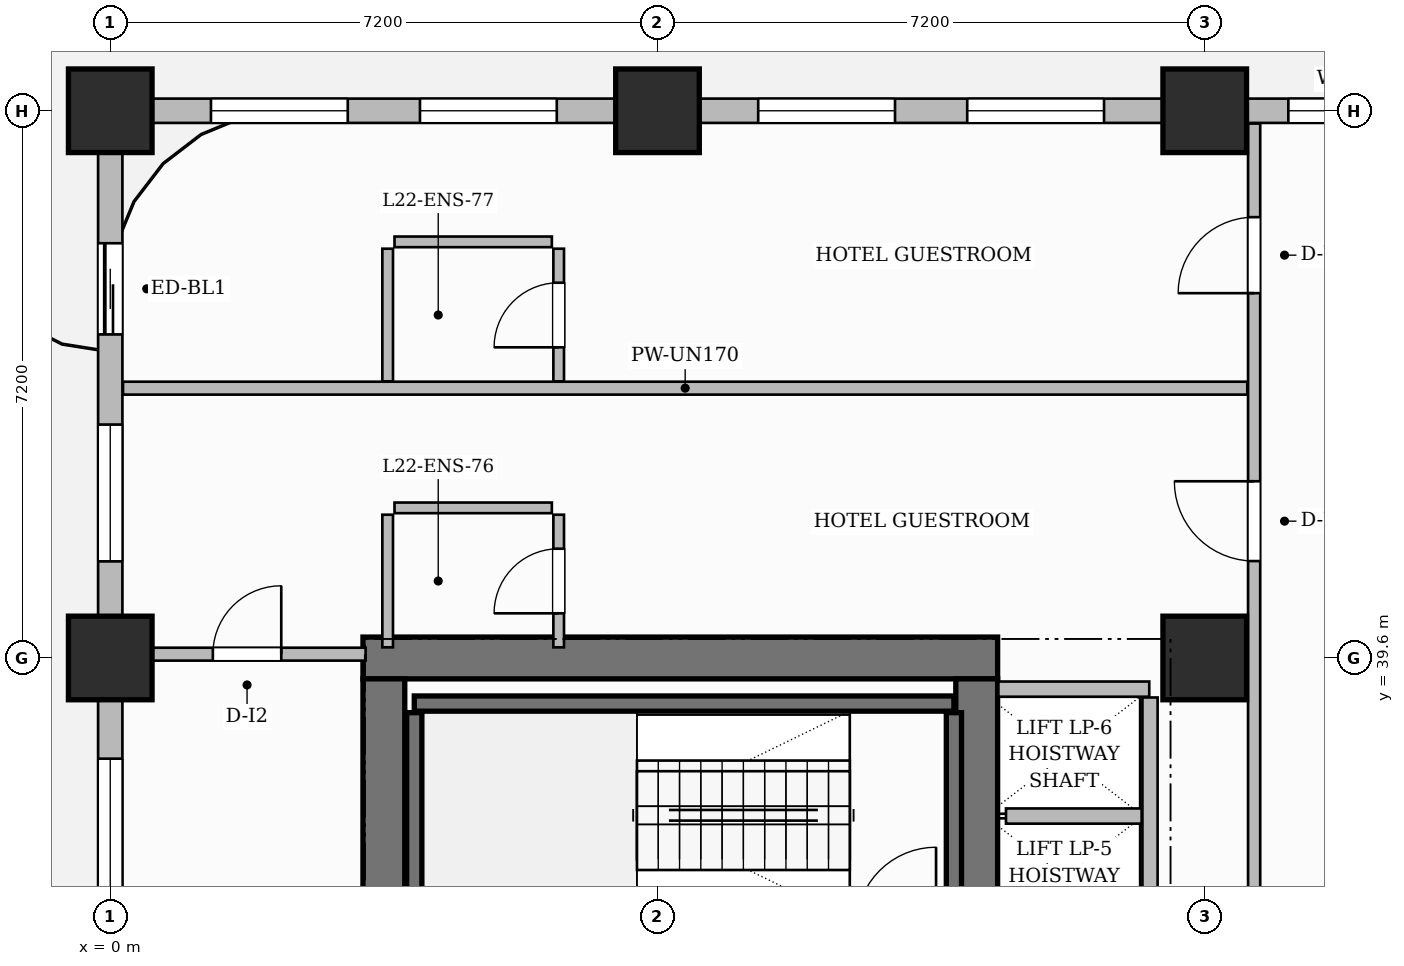
"""IFC4 building model, lengths in metres.
Left out: names, types, materials, properties, quantities, classifications, styles, units other than length and angle.
Written with IfcOpenShell. Run it as: python <this file> out.ifc"""

import sys

from ifc_helpers import new_model, si_unit, direction, frame, frame_2d, origin, origin_2d, place, context, subcontext, project, spatial, rectangle, extrude, source, transform, mapped, element, fill, save


model = new_model("IFC4")
c1 = context("Model", 3, precision=1e-05, world=origin(), true_north=direction((0.0, 1.0)))
c2 = subcontext(c1, "Body", "Model", "MODEL_VIEW")
j1 = project(units=[si_unit("LENGTHUNIT", "METRE"), si_unit("PLANEANGLEUNIT", "RADIAN")], contexts=[c1])
p1 = place(None, origin())
s1 = spatial("IfcSite", under=j1, at=p1, CompositionType="ELEMENT")
p2 = place(p1, origin())
s2 = spatial("IfcBuilding", under=s1, at=p2, CompositionType="ELEMENT")
p3 = place(p2, frame((0.0, 0.0, 91.6)))
s3 = spatial("IfcBuildingStorey", under=s2, at=p3, CompositionType="ELEMENT", Elevation=91.6)
p4 = place(p3, frame((3.325, 39.6, 0.0), z_axis=(0.0, 0.0, 1.0), x_axis=(1.0, 0.0, 0.0)))
e1 = element("IfcWall", 1, at=p4, inside=s3, PredefinedType="SHEAR", context=c2, shape_type="SweptSolid", body=[
    extrude(rectangle(XDim=8.35, YDim=0.55, at=frame_2d((4.175, 0.0))), origin(), (0.0, 0.0, 1.0), 3.7),
])
p5 = place(p3, frame((3.6, 25.475, 0.0), z_axis=(0.0, 0.0, 1.0), x_axis=(0.0, 1.0, 0.0)))
e2 = element("IfcWall", 2, at=p5, inside=s3, PredefinedType="SHEAR", context=c2, shape_type="SweptSolid", body=[
    extrude(rectangle(XDim=13.85, YDim=0.55, at=frame_2d((6.925, 0.0))), origin(), (0.0, 0.0, 1.0), 3.7),
])
p6 = place(p3, frame((11.4, 25.475, 0.0), z_axis=(0.0, 0.0, 1.0), x_axis=(0.0, 1.0, 0.0)))
e3 = element("IfcWall", 3, at=p6, inside=s3, PredefinedType="SHEAR", context=c2, shape_type="SweptSolid", body=[
    extrude(rectangle(XDim=13.85, YDim=0.55, at=frame_2d((6.925, 0.0))), origin(), (0.0, 0.0, 1.0), 3.7),
])
p7 = place(p6, frame((6.495, 0.0, 0.0)))
e4 = element("IfcOpeningElement", 4, at=p7, cuts=e3, PredefinedType="OPENING", context=c2, shape_type="SweptSolid", body=[
    extrude(rectangle(XDim=1.5, YDim=2.2, at=frame_2d((0.75, 1.1))), frame((0.0, 0.285, 0.0), z_axis=(0.0, -1.0, 0.0), x_axis=(1.0, 0.0, 0.0)), (0.0, 0.0, 1.0), 0.57),
])
m1 = source(origin(), c2, "Body", "SweptSolid", [
    extrude(rectangle(XDim=1.1, YDim=1.1, at=origin_2d()), origin(), (0.0, 0.0, 1.0), 3.7),
])
for number, where, z_axis, x_axis in (
    (5, (0.0, 39.6, 0.0), (0.0, 0.0, 1.0), (1.0, 0.0, 0.0)),
    (6, (0.0, 46.8, 0.0), (0.0, 0.0, 1.0), (1.0, 0.0, 0.0)),
    (7, (7.2, 46.8, 0.0), (0.0, 0.0, 1.0), (1.0, 0.0, 0.0)),
    (8, (14.4, 39.6, 0.0), (0.0, 0.0, 1.0), (1.0, 0.0, 0.0)),
    (9, (14.4, 46.8, 0.0), (0.0, 0.0, 1.0), (1.0, 0.0, 0.0)),
):
    element("IfcColumn", number, at=place(p3, frame(where, z_axis=z_axis, x_axis=x_axis)), inside=s3, PredefinedType="COLUMN", context=c2, shape_type="MappedRepresentation", body=[
        mapped(m1, transform((0.0, 0.0, 0.0), scale=1.0)),
    ])
p8 = place(p3, frame((4.0, 39.0, 0.0), z_axis=(0.0, 0.0, 1.0), x_axis=(1.0, 0.0, 0.0)))
e10 = element("IfcWall", 10, at=p8, inside=s3, PredefinedType="SHEAR", context=c2, shape_type="SweptSolid", body=[
    extrude(rectangle(XDim=7.1, YDim=0.2, at=frame_2d((3.55, 0.0))), origin(), (0.0, 0.0, 1.0), 3.7),
])
for number, where, z_axis, x_axis in (
    (11, (4.0, 36.18, 0.0), (0.0, 0.0, 1.0), (0.0, 1.0, 0.0)),
    (12, (11.1, 36.18, 0.0), (0.0, 0.0, 1.0), (0.0, 1.0, 0.0)),
):
    element("IfcWall", number, at=place(p3, frame(where, z_axis=z_axis, x_axis=x_axis)), inside=s3, PredefinedType="SHEAR", context=c2, shape_type="SweptSolid", body=[
        extrude(rectangle(XDim=2.7, YDim=0.2, at=frame_2d((1.35, 0.0))), origin(), (0.0, 0.0, 1.0), 3.7),
    ])
p9 = place(p3, frame((11.685, 39.19, 0.0), z_axis=(0.0, 0.0, 1.0), x_axis=(1.0, 0.0, 0.0)))
e13 = element("IfcWall", 13, at=p9, inside=s3, PredefinedType="PARTITIONING", context=c2, shape_type="SweptSolid", body=[
    extrude(rectangle(XDim=1.985, YDim=0.2, at=frame_2d((0.992, 0.0))), origin(), (0.0, 0.0, 1.0), 3.45),
])
p10 = place(p3, frame((13.68, 34.36, 0.0), z_axis=(0.0, 0.0, 1.0), x_axis=(0.0, 1.0, 0.0)))
e14 = element("IfcWall", 14, at=p10, inside=s3, PredefinedType="PARTITIONING", context=c2, shape_type="SweptSolid", body=[
    extrude(rectangle(XDim=4.72, YDim=0.2, at=frame_2d((2.36, 0.0))), origin(), (0.0, 0.0, 1.0), 3.45),
])
p11 = place(p3, frame((11.785, 37.52, 0.0), z_axis=(0.0, 0.0, 1.0), x_axis=(1.0, 0.0, 0.0)))
e15 = element("IfcWall", 15, at=p11, inside=s3, PredefinedType="PARTITIONING", context=c2, shape_type="SweptSolid", body=[
    extrude(rectangle(XDim=1.785, YDim=0.2, at=frame_2d((0.893, 0.0))), origin(), (0.0, 0.0, 1.0), 3.45),
])
p12 = place(p3, frame((0.24, 39.65, 0.0), z_axis=(0.0, 0.0, 1.0), x_axis=(1.0, 0.0, 0.0)))
e16 = element("IfcWall", 16, at=p12, inside=s3, PredefinedType="PARTITIONING", context=c2, shape_type="SweptSolid", body=[
    extrude(rectangle(XDim=3.12, YDim=0.17, at=frame_2d((1.56, 0.0))), origin(), (0.0, 0.0, 1.0), 3.45),
])
p13 = place(p12, frame((1.11, 0.0, 0.0)))
e17 = element("IfcOpeningElement", 17, at=p13, cuts=e16, PredefinedType="OPENING", context=c2, shape_type="SweptSolid", body=[
    extrude(rectangle(XDim=0.9, YDim=2.15, at=frame_2d((0.45, 1.075))), frame((0.0, 0.095, 0.0), z_axis=(0.0, -1.0, 0.0), x_axis=(1.0, 0.0, 0.0)), (0.0, 0.0, 1.0), 0.19),
])
p14 = place(p3, frame((15.05, 34.34, 0.0), z_axis=(0.0, 0.0, 1.0), x_axis=(0.0, 1.0, 0.0)))
e18 = element("IfcWall", 18, at=p14, inside=s3, PredefinedType="PARTITIONING", context=c2, shape_type="SweptSolid", body=[
    extrude(rectangle(XDim=12.292, YDim=0.16, at=frame_2d((6.146, 0.0))), origin(), (0.0, 0.0, 1.0), 3.45),
])
p15 = place(p14, frame((6.535, 0.0, 0.0)))
e19 = element("IfcOpeningElement", 19, at=p15, cuts=e18, PredefinedType="OPENING", context=c2, shape_type="SweptSolid", body=[
    extrude(rectangle(XDim=1.05, YDim=2.25, at=frame_2d((0.525, 1.125))), frame((0.0, 0.09, 0.0), z_axis=(0.0, -1.0, 0.0), x_axis=(1.0, 0.0, 0.0)), (0.0, 0.0, 1.0), 0.18),
])
p16 = place(p14, frame((10.06, 0.0, 0.0)))
e20 = element("IfcOpeningElement", 20, at=p16, cuts=e18, PredefinedType="OPENING", context=c2, shape_type="SweptSolid", body=[
    extrude(rectangle(XDim=1.0, YDim=2.2, at=frame_2d((0.5, 1.1))), frame((0.0, 0.09, 0.0), z_axis=(0.0, -1.0, 0.0), x_axis=(1.0, 0.0, 0.0)), (0.0, 0.0, 1.0), 0.18),
])
p17 = place(p3, frame((0.168, 43.15, 0.0), z_axis=(0.0, 0.0, 1.0), x_axis=(1.0, 0.0, 0.0)))
e21 = element("IfcWall", 21, at=p17, inside=s3, PredefinedType="PARTITIONING", context=c2, shape_type="SweptSolid", body=[
    extrude(rectangle(XDim=14.792, YDim=0.17, at=frame_2d((7.396, 0.0))), origin(), (0.0, 0.0, 1.0), 3.45),
])
p18 = place(p3, frame((3.65, 39.74, 0.0), z_axis=(0.0, 0.0, 1.0), x_axis=(0.0, 1.0, 0.0)))
e22 = element("IfcWall", 22, at=p18, inside=s3, PredefinedType="PARTITIONING", context=c2, shape_type="SweptSolid", body=[
    extrude(rectangle(XDim=1.745, YDim=0.14, at=frame_2d((0.873, 0.0))), origin(), (0.0, 0.0, 1.0), 3.45),
])
p19 = place(p3, frame((3.74, 41.575, 0.0), z_axis=(0.0, 0.0, 1.0), x_axis=(1.0, 0.0, 0.0)))
e23 = element("IfcWall", 23, at=p19, inside=s3, PredefinedType="PARTITIONING", context=c2, shape_type="SweptSolid", body=[
    extrude(rectangle(XDim=2.07, YDim=0.14, at=frame_2d((1.035, 0.0))), origin(), (0.0, 0.0, 1.0), 2.885),
])
p20 = place(p3, frame((5.9, 39.74, 0.0), z_axis=(0.0, 0.0, 1.0), x_axis=(0.0, 1.0, 0.0)))
e24 = element("IfcWall", 24, at=p20, inside=s3, PredefinedType="PARTITIONING", context=c2, shape_type="SweptSolid", body=[
    extrude(rectangle(XDim=1.745, YDim=0.14, at=frame_2d((0.873, 0.0))), origin(), (0.0, 0.0, 1.0), 3.45),
])
p21 = place(p20, frame((0.448, 0.0, 0.0)))
e25 = element("IfcOpeningElement", 25, at=p21, cuts=e24, PredefinedType="OPENING", context=c2, shape_type="SweptSolid", body=[
    extrude(rectangle(XDim=0.85, YDim=2.1, at=frame_2d((0.425, 1.05))), frame((0.0, 0.08, 0.0), z_axis=(0.0, -1.0, 0.0), x_axis=(1.0, 0.0, 0.0)), (0.0, 0.0, 1.0), 0.16),
])
p22 = place(p3, frame((3.65, 43.24, 0.0), z_axis=(0.0, 0.0, 1.0), x_axis=(0.0, 1.0, 0.0)))
e26 = element("IfcWall", 26, at=p22, inside=s3, PredefinedType="PARTITIONING", context=c2, shape_type="SweptSolid", body=[
    extrude(rectangle(XDim=1.745, YDim=0.14, at=frame_2d((0.873, 0.0))), origin(), (0.0, 0.0, 1.0), 3.45),
])
p23 = place(p3, frame((3.74, 45.075, 0.0), z_axis=(0.0, 0.0, 1.0), x_axis=(1.0, 0.0, 0.0)))
e27 = element("IfcWall", 27, at=p23, inside=s3, PredefinedType="PARTITIONING", context=c2, shape_type="SweptSolid", body=[
    extrude(rectangle(XDim=2.07, YDim=0.14, at=frame_2d((1.035, 0.0))), origin(), (0.0, 0.0, 1.0), 3.45),
])
p24 = place(p3, frame((5.9, 43.24, 0.0), z_axis=(0.0, 0.0, 1.0), x_axis=(0.0, 1.0, 0.0)))
e28 = element("IfcWall", 28, at=p24, inside=s3, PredefinedType="PARTITIONING", context=c2, shape_type="SweptSolid", body=[
    extrude(rectangle(XDim=1.745, YDim=0.14, at=frame_2d((0.873, 0.0))), origin(), (0.0, 0.0, 1.0), 3.45),
])
p25 = place(p24, frame((0.448, 0.0, 0.0)))
e29 = element("IfcOpeningElement", 29, at=p25, cuts=e28, PredefinedType="OPENING", context=c2, shape_type="SweptSolid", body=[
    extrude(rectangle(XDim=0.85, YDim=2.1, at=frame_2d((0.425, 1.05))), frame((0.0, 0.08, 0.0), z_axis=(0.0, -1.0, 0.0), x_axis=(1.0, 0.0, 0.0)), (0.0, 0.0, 1.0), 0.16),
])
p26 = place(p3, frame((0.0, 25.25, 0.0), z_axis=(0.0, 0.0, 1.0), x_axis=(0.0, 1.0, 0.0)))
e30 = element("IfcWall", 30, at=p26, inside=s3, PredefinedType="SOLIDWALL", context=c2, shape_type="SweptSolid", body=[
    extrude(rectangle(XDim=21.5, YDim=0.32, at=frame_2d((10.75, 0.0))), origin(), (0.0, 0.0, 1.0), 2.885),
])
p27 = place(p26, frame((18.607, 0.0, 0.0)))
e31 = element("IfcOpeningElement", 31, at=p27, cuts=e30, PredefinedType="OPENING", context=c2, shape_type="SweptSolid", body=[
    extrude(rectangle(XDim=1.2, YDim=2.2, at=frame_2d((0.6, 1.1))), frame((0.0, 0.17, 0.0), z_axis=(0.0, -1.0, 0.0), x_axis=(1.0, 0.0, 0.0)), (0.0, 0.0, 1.0), 0.34),
])
p28 = place(p26, frame((0.8, 0.0, 0.0)))
e32 = element("IfcOpeningElement", 32, at=p28, cuts=e30, PredefinedType="OPENING", context=c2, shape_type="SweptSolid", body=[
    extrude(rectangle(XDim=1.2, YDim=2.2, at=frame_2d((0.6, 1.1))), frame((0.0, 0.17, 0.0), z_axis=(0.0, -1.0, 0.0), x_axis=(1.0, 0.0, 0.0)), (0.0, 0.0, 1.0), 0.34),
])
p29 = place(p26, frame((3.425, 0.0, 0.8)))
e33 = element("IfcOpeningElement", 33, at=p29, cuts=e30, PredefinedType="OPENING", context=c2, shape_type="SweptSolid", body=[
    extrude(rectangle(XDim=1.8, YDim=1.85, at=frame_2d((0.9, 0.925))), frame((0.0, 0.17, 0.0), z_axis=(0.0, -1.0, 0.0), x_axis=(1.0, 0.0, 0.0)), (0.0, 0.0, 1.0), 0.34),
])
p30 = place(p26, frame((8.475, 0.0, 0.8)))
e34 = element("IfcOpeningElement", 34, at=p30, cuts=e30, PredefinedType="OPENING", context=c2, shape_type="SweptSolid", body=[
    extrude(rectangle(XDim=1.8, YDim=1.85, at=frame_2d((0.9, 0.925))), frame((0.0, 0.17, 0.0), z_axis=(0.0, -1.0, 0.0), x_axis=(1.0, 0.0, 0.0)), (0.0, 0.0, 1.0), 0.34),
])
p31 = place(p26, frame((11.225, 0.0, 0.8)))
e35 = element("IfcOpeningElement", 35, at=p31, cuts=e30, PredefinedType="OPENING", context=c2, shape_type="SweptSolid", body=[
    extrude(rectangle(XDim=1.8, YDim=1.85, at=frame_2d((0.9, 0.925))), frame((0.0, 0.17, 0.0), z_axis=(0.0, -1.0, 0.0), x_axis=(1.0, 0.0, 0.0)), (0.0, 0.0, 1.0), 0.34),
])
p32 = place(p26, frame((15.621, 0.0, 0.8)))
e36 = element("IfcOpeningElement", 36, at=p32, cuts=e30, PredefinedType="OPENING", context=c2, shape_type="SweptSolid", body=[
    extrude(rectangle(XDim=1.8, YDim=1.85, at=frame_2d((0.9, 0.925))), frame((0.0, 0.17, 0.0), z_axis=(0.0, -1.0, 0.0), x_axis=(1.0, 0.0, 0.0)), (0.0, 0.0, 1.0), 0.34),
])
p33 = place(p3, frame((0.0, 46.8, 0.0), z_axis=(0.0, 0.0, 1.0), x_axis=(1.0, 0.0, 0.0)))
e37 = element("IfcWall", 37, at=p33, inside=s3, PredefinedType="SOLIDWALL", context=c2, shape_type="SweptSolid", body=[
    extrude(rectangle(XDim=18.0, YDim=0.32, at=frame_2d((9.0, 0.0))), origin(), (0.0, 0.0, 1.0), 2.885),
])
p34 = place(p33, frame((1.325, 0.0, 0.8)))
e38 = element("IfcOpeningElement", 38, at=p34, cuts=e37, PredefinedType="OPENING", context=c2, shape_type="SweptSolid", body=[
    extrude(rectangle(XDim=1.8, YDim=1.85, at=frame_2d((0.9, 0.925))), frame((0.0, 0.17, 0.0), z_axis=(0.0, -1.0, 0.0), x_axis=(1.0, 0.0, 0.0)), (0.0, 0.0, 1.0), 0.34),
])
p35 = place(p33, frame((4.075, 0.0, 0.8)))
e39 = element("IfcOpeningElement", 39, at=p35, cuts=e37, PredefinedType="OPENING", context=c2, shape_type="SweptSolid", body=[
    extrude(rectangle(XDim=1.8, YDim=1.85, at=frame_2d((0.9, 0.925))), frame((0.0, 0.17, 0.0), z_axis=(0.0, -1.0, 0.0), x_axis=(1.0, 0.0, 0.0)), (0.0, 0.0, 1.0), 0.34),
])
p36 = place(p33, frame((8.525, 0.0, 0.8)))
e40 = element("IfcOpeningElement", 40, at=p36, cuts=e37, PredefinedType="OPENING", context=c2, shape_type="SweptSolid", body=[
    extrude(rectangle(XDim=1.8, YDim=1.85, at=frame_2d((0.9, 0.925))), frame((0.0, 0.17, 0.0), z_axis=(0.0, -1.0, 0.0), x_axis=(1.0, 0.0, 0.0)), (0.0, 0.0, 1.0), 0.34),
])
p37 = place(p33, frame((11.275, 0.0, 0.8)))
e41 = element("IfcOpeningElement", 41, at=p37, cuts=e37, PredefinedType="OPENING", context=c2, shape_type="SweptSolid", body=[
    extrude(rectangle(XDim=1.8, YDim=1.85, at=frame_2d((0.9, 0.925))), frame((0.0, 0.17, 0.0), z_axis=(0.0, -1.0, 0.0), x_axis=(1.0, 0.0, 0.0)), (0.0, 0.0, 1.0), 0.34),
])
p38 = place(p33, frame((15.5, 0.0, 0.8)))
e42 = element("IfcOpeningElement", 42, at=p38, cuts=e37, PredefinedType="OPENING", context=c2, shape_type="SweptSolid", body=[
    extrude(rectangle(XDim=1.4, YDim=1.85, at=frame_2d((0.7, 0.925))), frame((0.0, 0.17, 0.0), z_axis=(0.0, -1.0, 0.0), x_axis=(1.0, 0.0, 0.0)), (0.0, 0.0, 1.0), 0.34),
])
m2 = source(origin(), c2, "Body", "SweptSolid", [
    extrude(rectangle(XDim=0.9, YDim=2.15, at=frame_2d((0.45, 1.075))), frame((0.0, 0.025, 0.0), z_axis=(0.0, -1.0, 0.0), x_axis=(1.0, 0.0, 0.0)), (0.0, 0.0, 1.0), 0.05),
])
p39 = place(p13, origin())
e43 = element("IfcDoor", 43, at=p39, inside=s3, OperationType="SINGLE_SWING_RIGHT", PredefinedType="DOOR", context=c2, shape_type="MappedRepresentation", body=[
    mapped(m2, transform((0.0, 0.0, 0.0), scale=1.0)),
])
fill(e17, e43)
m3 = source(origin(), c2, "Body", "SweptSolid", [
    extrude(rectangle(XDim=0.85, YDim=2.1, at=frame_2d((0.425, 1.05))), frame((0.0, 0.025, 0.0), z_axis=(0.0, -1.0, 0.0), x_axis=(1.0, 0.0, 0.0)), (0.0, 0.0, 1.0), 0.05),
])
p40 = place(p21, origin())
e44 = element("IfcDoor", 44, at=p40, inside=s3, OperationType="SINGLE_SWING_LEFT", PredefinedType="DOOR", context=c2, shape_type="MappedRepresentation", body=[
    mapped(m3, transform((0.0, 0.0, 0.0), scale=1.0)),
])
fill(e25, e44)
m4 = source(origin(), c2, "Body", "SweptSolid", [
    extrude(rectangle(XDim=1.05, YDim=2.25, at=frame_2d((0.525, 1.125))), frame((0.0, 0.025, 0.0), z_axis=(0.0, -1.0, 0.0), x_axis=(1.0, 0.0, 0.0)), (0.0, 0.0, 1.0), 0.05),
])
p41 = place(p15, origin())
e45 = element("IfcDoor", 45, at=p41, inside=s3, OperationType="SINGLE_SWING_RIGHT", PredefinedType="DOOR", context=c2, shape_type="MappedRepresentation", body=[
    mapped(m4, transform((0.0, 0.0, 0.0), scale=1.0)),
])
fill(e19, e45)
p42 = place(p25, origin())
e46 = element("IfcDoor", 46, at=p42, inside=s3, OperationType="SINGLE_SWING_LEFT", PredefinedType="DOOR", context=c2, shape_type="MappedRepresentation", body=[
    mapped(m3, transform((0.0, 0.0, 0.0), scale=1.0)),
])
fill(e29, e46)
m5 = source(origin(), c2, "Body", "SweptSolid", [
    extrude(rectangle(XDim=1.0, YDim=2.2, at=frame_2d((0.5, 1.1))), frame((0.0, 0.025, 0.0), z_axis=(0.0, -1.0, 0.0), x_axis=(1.0, 0.0, 0.0)), (0.0, 0.0, 1.0), 0.05),
])
p43 = place(p16, origin())
e47 = element("IfcDoor", 47, at=p43, inside=s3, OperationType="SINGLE_SWING_LEFT", PredefinedType="DOOR", context=c2, shape_type="MappedRepresentation", body=[
    mapped(m5, transform((0.0, 0.0, 0.0), scale=1.0)),
])
fill(e20, e47)
m6 = source(origin(), c2, "Body", "SweptSolid", [
    extrude(rectangle(XDim=1.2, YDim=2.2, at=frame_2d((0.6, 1.1))), frame((0.0, 0.025, 0.0), z_axis=(0.0, -1.0, 0.0), x_axis=(1.0, 0.0, 0.0)), (0.0, 0.0, 1.0), 0.05),
])
p44 = place(p27, origin())
e48 = element("IfcDoor", 48, at=p44, inside=s3, OperationType="SLIDING_TO_LEFT", PredefinedType="DOOR", context=c2, shape_type="MappedRepresentation", body=[
    mapped(m6, transform((0.0, 0.0, 0.0), scale=1.0)),
])
fill(e31, e48)
m7 = source(origin(), c2, "Body", "SweptSolid", [
    extrude(rectangle(XDim=1.8, YDim=1.85, at=frame_2d((0.9, 0.925))), frame((0.0, 0.03, 0.0), z_axis=(0.0, -1.0, 0.0), x_axis=(1.0, 0.0, 0.0)), (0.0, 0.0, 1.0), 0.06),
])
p45 = place(p31, origin())
e49 = element("IfcWindow", 49, at=p45, inside=s3, PartitioningType="DOUBLE_PANEL_VERTICAL", PredefinedType="WINDOW", context=c2, shape_type="MappedRepresentation", body=[
    mapped(m7, transform((0.0, 0.0, 0.0), scale=1.0)),
])
fill(e35, e49)
p46 = place(p32, origin())
e50 = element("IfcWindow", 50, at=p46, inside=s3, PartitioningType="DOUBLE_PANEL_VERTICAL", PredefinedType="WINDOW", context=c2, shape_type="MappedRepresentation", body=[
    mapped(m7, transform((0.0, 0.0, 0.0), scale=1.0)),
])
fill(e36, e50)
p47 = place(p34, origin())
e51 = element("IfcWindow", 51, at=p47, inside=s3, PartitioningType="DOUBLE_PANEL_VERTICAL", PredefinedType="WINDOW", context=c2, shape_type="MappedRepresentation", body=[
    mapped(m7, transform((0.0, 0.0, 0.0), scale=1.0)),
])
fill(e38, e51)
p48 = place(p35, origin())
e52 = element("IfcWindow", 52, at=p48, inside=s3, PartitioningType="DOUBLE_PANEL_VERTICAL", PredefinedType="WINDOW", context=c2, shape_type="MappedRepresentation", body=[
    mapped(m7, transform((0.0, 0.0, 0.0), scale=1.0)),
])
fill(e39, e52)
p49 = place(p36, origin())
e53 = element("IfcWindow", 53, at=p49, inside=s3, PartitioningType="DOUBLE_PANEL_VERTICAL", PredefinedType="WINDOW", context=c2, shape_type="MappedRepresentation", body=[
    mapped(m7, transform((0.0, 0.0, 0.0), scale=1.0)),
])
fill(e40, e53)
p50 = place(p37, origin())
e54 = element("IfcWindow", 54, at=p50, inside=s3, PartitioningType="DOUBLE_PANEL_VERTICAL", PredefinedType="WINDOW", context=c2, shape_type="MappedRepresentation", body=[
    mapped(m7, transform((0.0, 0.0, 0.0), scale=1.0)),
])
fill(e41, e54)
m8 = source(origin(), c2, "Body", "SweptSolid", [
    extrude(rectangle(XDim=1.4, YDim=1.85, at=frame_2d((0.7, 0.925))), frame((0.0, 0.03, 0.0), z_axis=(0.0, -1.0, 0.0), x_axis=(1.0, 0.0, 0.0)), (0.0, 0.0, 1.0), 0.06),
])
p51 = place(p38, origin())
e55 = element("IfcWindow", 55, at=p51, inside=s3, PartitioningType="SINGLE_PANEL", PredefinedType="WINDOW", context=c2, shape_type="MappedRepresentation", body=[
    mapped(m8, transform((0.0, 0.0, 0.0), scale=1.0)),
])
fill(e42, e55)
save(model, sys.argv[1])
